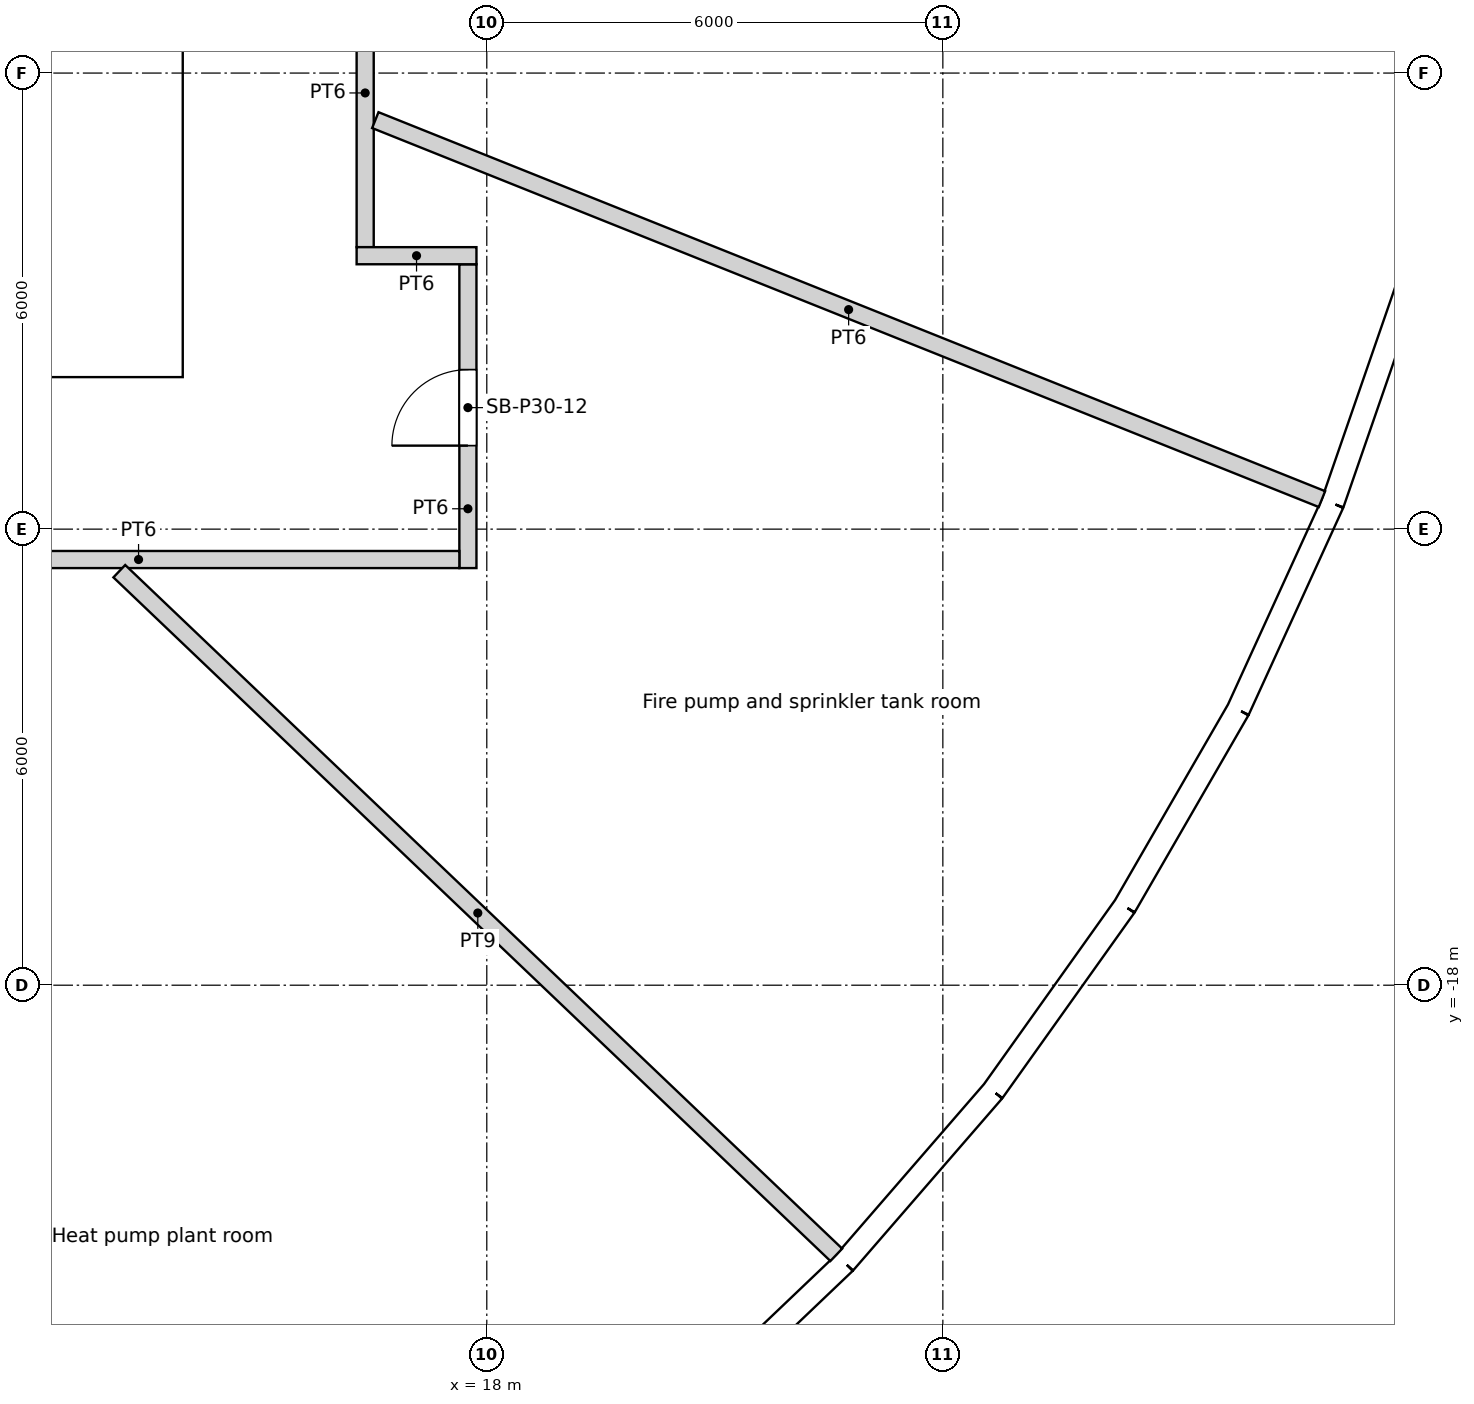
"""IFC4 building model, lengths in metres.
Left out: names, types, materials, properties, quantities, classifications, styles, units other than length and angle.
Written with IfcOpenShell. Run it as: python <this file> out.ifc"""

import sys

from ifc_helpers import new_model, si_unit, direction, frame, frame_2d, origin, origin_2d, place, context, subcontext, project, spatial, rectangle, circle, extrude, element, fill, save


model = new_model("IFC4")
c1 = context("Model", 3, precision=1e-05, world=origin(), true_north=direction((0.0, 1.0)))
c2 = subcontext(c1, "Body", "Model", "MODEL_VIEW")
j1 = project(units=[si_unit("LENGTHUNIT", "METRE"), si_unit("PLANEANGLEUNIT", "RADIAN")], contexts=[c1])
p1 = place(None, origin())
s1 = spatial("IfcSite", under=j1, at=p1, CompositionType="ELEMENT")
p2 = place(p1, origin())
s2 = spatial("IfcBuilding", under=s1, at=p2, CompositionType="ELEMENT")
p3 = place(p2, frame((0.0, 0.0, 120.0)))
s3 = spatial("IfcBuildingStorey", under=s2, at=p3, CompositionType="ELEMENT", Elevation=120.0)
for number, where, z_axis, x_axis in (
    (1, (21.911, -20.892, 0.0), (0.0, 0.0, 1.0), (1.0, 0.0, 0.0)),
    (2, (25.469, -16.368, 0.0), (0.0, 0.0, 1.0), (1.0, 0.0, 0.0)),
    (3, (28.106, -11.252, 0.0), (0.0, 0.0, 1.0), (1.0, 0.0, 0.0)),
    (4, (29.728, -5.729, 0.0), (0.0, 0.0, 1.0), (1.0, 0.0, 0.0)),
):
    element("IfcColumn", number, at=place(p3, frame(where, z_axis=z_axis, x_axis=x_axis)), inside=s3, PredefinedType="COLUMN", context=c2, shape_type="SweptSolid", body=[
        extrude(circle(Radius=0.6, at=origin_2d()), origin(), (0.0, 0.0, 1.0), 6.0),
    ])
for number, where, z_axis, x_axis in (
    (5, (14.659, -19.69, 0.0), (0.0, 0.0, 1.0), (1.0, 0.0, 0.0)),
    (6, (18.805, -15.779, 0.0), (0.0, 0.0, 1.0), (1.0, 0.0, 0.0)),
    (7, (21.937, -11.017, 0.0), (0.0, 0.0, 1.0), (1.0, 0.0, 0.0)),
    (8, (23.886, -5.661, 0.0), (0.0, 0.0, 1.0), (1.0, 0.0, 0.0)),
):
    element("IfcColumn", number, at=place(p3, frame(where, z_axis=z_axis, x_axis=x_axis)), inside=s3, PredefinedType="COLUMN", context=c2, shape_type="SweptSolid", body=[
        extrude(circle(Radius=0.65, at=origin_2d()), origin(), (0.0, 0.0, 1.0), 6.0),
    ])
for number, where, z_axis, x_axis in (
    (9, (11.735, -14.716, 0.0), (0.0, 0.0, 1.0), (1.0, 0.0, 0.0)),
    (10, (15.552, -10.603, 0.0), (0.0, 0.0, 1.0), (1.0, 0.0, 0.0)),
    (11, (17.986, -5.548, 0.0), (0.0, 0.0, 1.0), (1.0, 0.0, 0.0)),
):
    element("IfcColumn", number, at=place(p3, frame(where, z_axis=z_axis, x_axis=x_axis)), inside=s3, PredefinedType="COLUMN", context=c2, shape_type="SweptSolid", body=[
        extrude(circle(Radius=0.7, at=origin_2d()), origin(), (0.0, 0.0, 1.0), 6.0),
    ])
p4 = place(p3, frame((20.546, -23.711, 0.0), z_axis=(0.0, 0.0, 1.0), x_axis=(0.723750841228, 0.690061388444, 0.0)))
e12 = element("IfcWall", 12, at=p4, inside=s3, PredefinedType="SOLIDWALL", context=c2, shape_type="SweptSolid", body=[
    extrude(rectangle(XDim=2.986, YDim=0.3, at=frame_2d((1.493, 0.0))), origin(), (0.0, 0.0, 1.0), 5.7),
])
p5 = place(p4, frame((1.493, 0.0, 1.8)))
e13 = element("IfcOpeningElement", 13, at=p5, cuts=e12, PredefinedType="OPENING", context=c2, shape_type="SweptSolid", body=[
    extrude(circle(Radius=1.2, at=origin_2d()), frame((0.0, 0.16, 0.0), z_axis=(0.0, -1.0, 0.0), x_axis=(1.0, 0.0, 0.0)), (0.0, 0.0, 1.0), 0.32),
])
p6 = place(p3, frame((22.707, -21.651, 0.0), z_axis=(0.0, 0.0, 1.0), x_axis=(0.654809121128, 0.755794294029, 0.0)))
e14 = element("IfcWall", 14, at=p6, inside=s3, PredefinedType="SOLIDWALL", context=c2, shape_type="SweptSolid", body=[
    extrude(rectangle(XDim=2.986, YDim=0.3, at=frame_2d((1.493, 0.0))), origin(), (0.0, 0.0, 1.0), 5.7),
])
p7 = place(p6, frame((1.493, 0.0, 1.8)))
e15 = element("IfcOpeningElement", 15, at=p7, cuts=e14, PredefinedType="OPENING", context=c2, shape_type="SweptSolid", body=[
    extrude(circle(Radius=1.2, at=origin_2d()), frame((0.0, 0.16, 0.0), z_axis=(0.0, -1.0, 0.0), x_axis=(1.0, 0.0, 0.0)), (0.0, 0.0, 1.0), 0.32),
])
p8 = place(p3, frame((24.662, -19.394, 0.0), z_axis=(0.0, 0.0, 1.0), x_axis=(0.580100533892, 0.814544885551, 0.0)))
e16 = element("IfcWall", 16, at=p8, inside=s3, PredefinedType="SOLIDWALL", context=c2, shape_type="SweptSolid", body=[
    extrude(rectangle(XDim=2.986, YDim=0.3, at=frame_2d((1.493, 0.0))), origin(), (0.0, 0.0, 1.0), 5.7),
])
p9 = place(p8, frame((1.493, 0.0, 1.8)))
e17 = element("IfcOpeningElement", 17, at=p9, cuts=e16, PredefinedType="OPENING", context=c2, shape_type="SweptSolid", body=[
    extrude(circle(Radius=1.2, at=origin_2d()), frame((0.0, 0.16, 0.0), z_axis=(0.0, -1.0, 0.0), x_axis=(1.0, 0.0, 0.0)), (0.0, 0.0, 1.0), 0.32),
])
p10 = place(p3, frame((26.394, -16.962, 0.0), z_axis=(0.0, 0.0, 1.0), x_axis=(0.500017373705, 0.866015372839, 0.0)))
e18 = element("IfcWall", 18, at=p10, inside=s3, PredefinedType="SOLIDWALL", context=c2, shape_type="SweptSolid", body=[
    extrude(rectangle(XDim=2.986, YDim=0.3, at=frame_2d((1.493, 0.0))), origin(), (0.0, 0.0, 1.0), 5.7),
])
p11 = place(p10, frame((1.493, 0.0, 1.8)))
e19 = element("IfcOpeningElement", 19, at=p11, cuts=e18, PredefinedType="OPENING", context=c2, shape_type="SweptSolid", body=[
    extrude(circle(Radius=1.2, at=origin_2d()), frame((0.0, 0.16, 0.0), z_axis=(0.0, -1.0, 0.0), x_axis=(1.0, 0.0, 0.0)), (0.0, 0.0, 1.0), 0.32),
])
p12 = place(p3, frame((27.887, -14.377, 0.0), z_axis=(0.0, 0.0, 1.0), x_axis=(0.415373250944, 0.909651066289, 0.0)))
e20 = element("IfcWall", 20, at=p12, inside=s3, PredefinedType="SOLIDWALL", context=c2, shape_type="SweptSolid", body=[
    extrude(rectangle(XDim=2.986, YDim=0.3, at=frame_2d((1.493, 0.0))), origin(), (0.0, 0.0, 1.0), 5.7),
])
p13 = place(p12, frame((1.493, 0.0, 1.8)))
e21 = element("IfcOpeningElement", 21, at=p13, cuts=e20, PredefinedType="OPENING", context=c2, shape_type="SweptSolid", body=[
    extrude(circle(Radius=1.2, at=origin_2d()), frame((0.0, 0.16, 0.0), z_axis=(0.0, -1.0, 0.0), x_axis=(1.0, 0.0, 0.0)), (0.0, 0.0, 1.0), 0.32),
])
p14 = place(p3, frame((29.127, -11.661, 0.0), z_axis=(0.0, 0.0, 1.0), x_axis=(0.327074054052, 0.944998710669, 0.0)))
e22 = element("IfcWall", 22, at=p14, inside=s3, PredefinedType="SOLIDWALL", context=c2, shape_type="SweptSolid", body=[
    extrude(rectangle(XDim=2.986, YDim=0.3, at=frame_2d((1.493, 0.0))), origin(), (0.0, 0.0, 1.0), 5.7),
])
p15 = place(p14, frame((1.493, 0.0, 1.8)))
e23 = element("IfcOpeningElement", 23, at=p15, cuts=e22, PredefinedType="OPENING", context=c2, shape_type="SweptSolid", body=[
    extrude(circle(Radius=1.2, at=origin_2d()), frame((0.0, 0.16, 0.0), z_axis=(0.0, -1.0, 0.0), x_axis=(1.0, 0.0, 0.0)), (0.0, 0.0, 1.0), 0.32),
])
p16 = place(p3, frame((-14.0, -9.4, 0.0), z_axis=(0.0, 0.0, 1.0), x_axis=(1.0, 0.0, 0.0)))
e24 = element("IfcWall", 24, at=p16, inside=s3, PredefinedType="SOLIDWALL", context=c2, shape_type="SweptSolid", body=[
    extrude(rectangle(XDim=28.0, YDim=1.2, at=frame_2d((14.0, 0.0))), origin(), (0.0, 0.0, 1.0), 5.7),
])
p17 = place(p16, frame((14.9, 0.0, 0.0)))
e25 = element("IfcOpeningElement", 25, at=p17, cuts=e24, PredefinedType="OPENING", context=c2, shape_type="SweptSolid", body=[
    extrude(rectangle(XDim=1.0, YDim=2.1, at=frame_2d((0.5, 1.05))), frame((0.0, 0.6, 0.0), z_axis=(0.0, -1.0, 0.0), x_axis=(1.0, 0.0, 0.0)), (0.0, 0.0, 1.0), 1.2),
])
p18 = place(p16, frame((9.8, 0.0, 0.0)))
e26 = element("IfcOpeningElement", 26, at=p18, cuts=e24, PredefinedType="OPENING", context=c2, shape_type="SweptSolid", body=[
    extrude(rectangle(XDim=1.8, YDim=2.1, at=frame_2d((0.9, 1.05))), frame((0.0, 0.6, 0.0), z_axis=(0.0, -1.0, 0.0), x_axis=(1.0, 0.0, 0.0)), (0.0, 0.0, 1.0), 1.2),
])
p19 = place(p16, frame((16.4, 0.0, 0.0)))
e27 = element("IfcOpeningElement", 27, at=p19, cuts=e24, PredefinedType="OPENING", context=c2, shape_type="SweptSolid", body=[
    extrude(rectangle(XDim=1.8, YDim=2.1, at=frame_2d((0.9, 1.05))), frame((0.0, 0.6, 0.0), z_axis=(0.0, -1.0, 0.0), x_axis=(1.0, 0.0, 0.0)), (0.0, 0.0, 1.0), 1.2),
])
p20 = place(p3, frame((13.4, -8.8, 0.0), z_axis=(0.0, 0.0, 1.0), x_axis=(0.0, 1.0, 0.0)))
e28 = element("IfcWall", 28, at=p20, inside=s3, PredefinedType="SOLIDWALL", context=c2, shape_type="SweptSolid", body=[
    extrude(rectangle(XDim=17.6, YDim=1.2, at=frame_2d((8.8, 0.0))), origin(), (0.0, 0.0, 1.0), 5.7),
])
p21 = place(p20, frame((6.3, 0.0, 0.0)))
e29 = element("IfcOpeningElement", 29, at=p21, cuts=e28, PredefinedType="OPENING", context=c2, shape_type="SweptSolid", body=[
    extrude(rectangle(XDim=1.0, YDim=2.1, at=frame_2d((0.5, 1.05))), frame((0.0, 0.6, 0.0), z_axis=(0.0, -1.0, 0.0), x_axis=(1.0, 0.0, 0.0)), (0.0, 0.0, 1.0), 1.2),
])
p22 = place(p3, frame((12.2, -8.8, 0.0), z_axis=(0.0, 0.0, 1.0), x_axis=(0.0, 1.0, 0.0)))
e30 = element("IfcWall", 30, at=p22, inside=s3, PredefinedType="SOLIDWALL", context=c2, shape_type="SweptSolid", body=[
    extrude(rectangle(XDim=4.1, YDim=1.2, at=frame_2d((2.05, 0.0))), origin(), (0.0, 0.0, 1.0), 5.7),
])
p23 = place(p3, frame((4.411, -12.4, 0.0), z_axis=(0.0, 0.0, 1.0), x_axis=(1.0, 0.0, 0.0)))
e31 = element("IfcWall", 31, at=p23, inside=s3, PredefinedType="PARTITIONING", context=c2, shape_type="SweptSolid", body=[
    extrude(rectangle(XDim=13.229, YDim=0.225, at=frame_2d((6.614, 0.0))), origin(), (0.0, 0.0, 1.0), 5.2),
])
p24 = place(p23, frame((3.738, 0.0, 0.0)))
e32 = element("IfcOpeningElement", 32, at=p24, cuts=e31, PredefinedType="OPENING", context=c2, shape_type="SweptSolid", body=[
    extrude(rectangle(XDim=1.0, YDim=2.1, at=frame_2d((0.5, 1.05))), frame((0.0, 0.113, 0.0), z_axis=(0.0, -1.0, 0.0), x_axis=(1.0, 0.0, 0.0)), (0.0, 0.0, 1.0), 0.225),
])
p25 = place(p3, frame((16.4, -8.29, 0.0), z_axis=(0.0, 0.0, 1.0), x_axis=(0.0, 1.0, 0.0)))
e33 = element("IfcWall", 33, at=p25, inside=s3, PredefinedType="PARTITIONING", context=c2, shape_type="SweptSolid", body=[
    extrude(rectangle(XDim=8.29, YDim=0.225, at=frame_2d((4.145, 0.0))), origin(), (0.0, 0.0, 1.0), 5.2),
])
p26 = place(p25, frame((4.108, 0.0, 0.0)))
e34 = element("IfcOpeningElement", 34, at=p26, cuts=e33, PredefinedType="OPENING", context=c2, shape_type="SweptSolid", body=[
    extrude(rectangle(XDim=1.8, YDim=2.4, at=frame_2d((0.9, 1.2))), frame((0.0, 0.113, 0.0), z_axis=(0.0, -1.0, 0.0), x_axis=(1.0, 0.0, 0.0)), (0.0, 0.0, 1.0), 0.225),
])
p27 = place(p3, frame((17.752, -12.512, 0.0), z_axis=(0.0, 0.0, 1.0), x_axis=(0.0, 1.0, 0.0)))
e35 = element("IfcWall", 35, at=p27, inside=s3, PredefinedType="PARTITIONING", context=c2, shape_type="SweptSolid", body=[
    extrude(rectangle(XDim=3.997, YDim=0.225, at=frame_2d((1.999, 0.0))), origin(), (0.0, 0.0, 1.0), 5.2),
])
p28 = place(p27, frame((1.611, 0.0, 0.0)))
e36 = element("IfcOpeningElement", 36, at=p28, cuts=e35, PredefinedType="OPENING", context=c2, shape_type="SweptSolid", body=[
    extrude(rectangle(XDim=1.0, YDim=2.1, at=frame_2d((0.5, 1.05))), frame((0.0, 0.113, 0.0), z_axis=(0.0, -1.0, 0.0), x_axis=(1.0, 0.0, 0.0)), (0.0, 0.0, 1.0), 0.225),
])
p29 = place(p3, frame((17.864, -8.403, 0.0), z_axis=(0.0, 0.0, 1.0), x_axis=(-1.0, 0.0, 0.0)))
e37 = element("IfcWall", 37, at=p29, inside=s3, PredefinedType="PARTITIONING", context=c2, shape_type="SweptSolid", body=[
    extrude(rectangle(XDim=1.576, YDim=0.225, at=frame_2d((0.788, 0.0))), origin(), (0.0, 0.0, 1.0), 5.2),
])
p30 = place(p3, frame((22.598, -21.547, 0.0), z_axis=(0.0, 0.0, 1.0), x_axis=(-0.72374624757, 0.690066206337, 0.0)))
e38 = element("IfcWall", 38, at=p30, inside=s3, PredefinedType="PARTITIONING", context=c2, shape_type="SweptSolid", body=[
    extrude(rectangle(XDim=13.033, YDim=0.225, at=frame_2d((6.517, 0.0))), origin(), (0.0, 0.0, 1.0), 2.7),
])
p31 = place(p3, frame((28.988, -11.605, 0.0), z_axis=(0.0, 0.0, 1.0), x_axis=(-0.928362433176, 0.371676193303, 0.0)))
e39 = element("IfcWall", 39, at=p31, inside=s3, PredefinedType="PARTITIONING", context=c2, shape_type="SweptSolid", body=[
    extrude(rectangle(XDim=13.415, YDim=0.225, at=frame_2d((6.708, 0.0))), origin(), (0.0, 0.0, 1.0), 5.2),
])
p32 = place(p5, origin())
e40 = element("IfcWindow", 40, at=p32, inside=s3, PartitioningType="SINGLE_PANEL", PredefinedType="WINDOW", context=c2, shape_type="SweptSolid", body=[
    extrude(circle(Radius=1.2, at=origin_2d()), frame((0.0, 0.12, 0.0), z_axis=(0.0, -1.0, 0.0), x_axis=(1.0, 0.0, 0.0)), (0.0, 0.0, 1.0), 0.1),
])
fill(e13, e40)
p33 = place(p7, origin())
e41 = element("IfcWindow", 41, at=p33, inside=s3, PartitioningType="SINGLE_PANEL", PredefinedType="WINDOW", context=c2, shape_type="SweptSolid", body=[
    extrude(circle(Radius=1.2, at=origin_2d()), frame((0.0, 0.12, 0.0), z_axis=(0.0, -1.0, 0.0), x_axis=(1.0, 0.0, 0.0)), (0.0, 0.0, 1.0), 0.1),
])
fill(e15, e41)
p34 = place(p9, origin())
e42 = element("IfcWindow", 42, at=p34, inside=s3, PartitioningType="SINGLE_PANEL", PredefinedType="WINDOW", context=c2, shape_type="SweptSolid", body=[
    extrude(circle(Radius=1.2, at=origin_2d()), frame((0.0, 0.12, 0.0), z_axis=(0.0, -1.0, 0.0), x_axis=(1.0, 0.0, 0.0)), (0.0, 0.0, 1.0), 0.1),
])
fill(e17, e42)
p35 = place(p11, origin())
e43 = element("IfcWindow", 43, at=p35, inside=s3, PartitioningType="SINGLE_PANEL", PredefinedType="WINDOW", context=c2, shape_type="SweptSolid", body=[
    extrude(circle(Radius=1.2, at=origin_2d()), frame((0.0, 0.12, 0.0), z_axis=(0.0, -1.0, 0.0), x_axis=(1.0, 0.0, 0.0)), (0.0, 0.0, 1.0), 0.1),
])
fill(e19, e43)
p36 = place(p13, origin())
e44 = element("IfcWindow", 44, at=p36, inside=s3, PartitioningType="SINGLE_PANEL", PredefinedType="WINDOW", context=c2, shape_type="SweptSolid", body=[
    extrude(circle(Radius=1.2, at=origin_2d()), frame((0.0, 0.12, 0.0), z_axis=(0.0, -1.0, 0.0), x_axis=(1.0, 0.0, 0.0)), (0.0, 0.0, 1.0), 0.1),
])
fill(e21, e44)
p37 = place(p15, origin())
e45 = element("IfcWindow", 45, at=p37, inside=s3, PartitioningType="SINGLE_PANEL", PredefinedType="WINDOW", context=c2, shape_type="SweptSolid", body=[
    extrude(circle(Radius=1.2, at=origin_2d()), frame((0.0, 0.12, 0.0), z_axis=(0.0, -1.0, 0.0), x_axis=(1.0, 0.0, 0.0)), (0.0, 0.0, 1.0), 0.1),
])
fill(e23, e45)
p38 = place(p28, origin())
e46 = element("IfcDoor", 46, at=p38, inside=s3, OperationType="SINGLE_SWING_LEFT", PredefinedType="DOOR", context=c2, shape_type="SweptSolid", body=[
    extrude(rectangle(XDim=1.0, YDim=2.1, at=frame_2d((0.5, 1.05))), frame((0.0, 0.025, 0.0), z_axis=(0.0, -1.0, 0.0), x_axis=(1.0, 0.0, 0.0)), (0.0, 0.0, 1.0), 0.05),
])
fill(e36, e46)
save(model, sys.argv[1])
